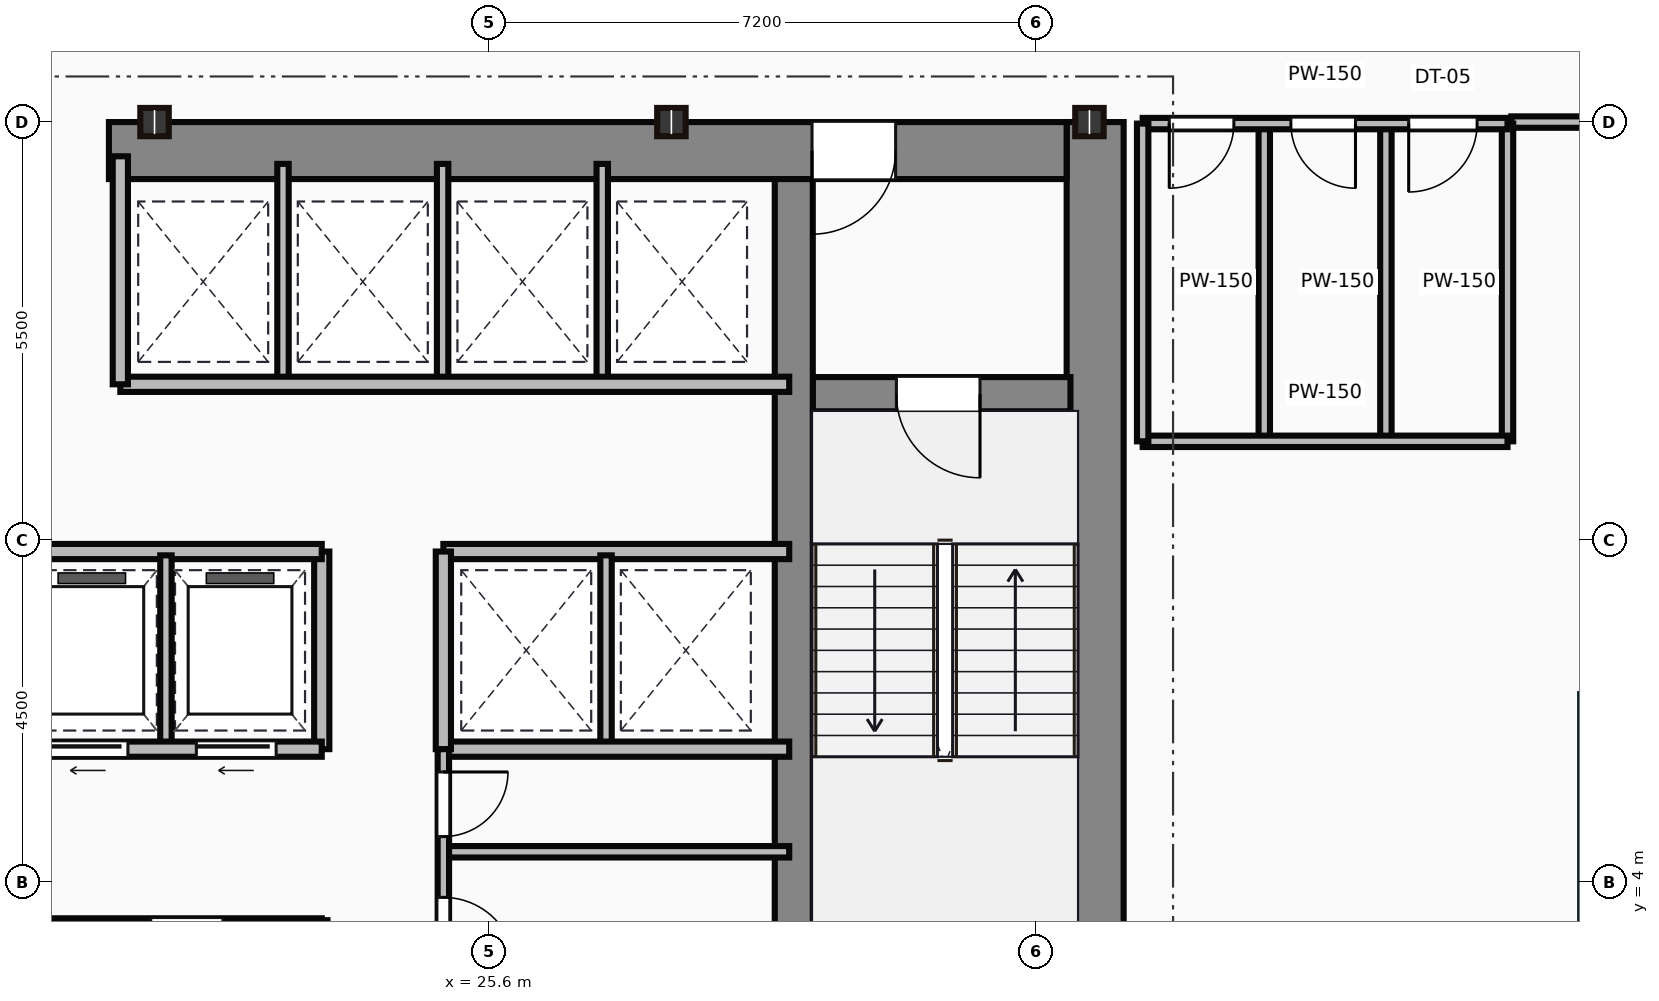
"""IFC4 building model, lengths in metres.
Left out: names, types, materials, properties, quantities, classifications, styles, units other than length and angle.
Written with IfcOpenShell. Run it as: python <this file> out.ifc"""

import sys

from ifc_helpers import new_model, si_unit, direction, frame, frame_2d, origin, origin_2d, place, context, subcontext, project, spatial, rectangle, i_section, extrude, source, transform, mapped, element, fill, save


model = new_model("IFC4")
c1 = context("Model", 3, precision=1e-05, world=origin(), true_north=direction((0.0, 1.0)))
c2 = subcontext(c1, "Body", "Model", "MODEL_VIEW")
j1 = project(units=[si_unit("LENGTHUNIT", "METRE"), si_unit("PLANEANGLEUNIT", "RADIAN")], contexts=[c1])
p1 = place(None, origin())
s1 = spatial("IfcSite", under=j1, at=p1, CompositionType="ELEMENT")
p2 = place(p1, origin())
s2 = spatial("IfcBuilding", under=s1, at=p2, CompositionType="ELEMENT")
p3 = place(p2, frame((0.0, 0.0, 140.6)))
s3 = spatial("IfcBuildingStorey", under=s2, at=p3, CompositionType="ELEMENT", Elevation=140.6)
m1 = source(origin(), c2, "Body", "SweptSolid", [
    extrude(rectangle(XDim=13.1, YDim=0.75, at=frame_2d((6.55, 0.0))), origin(), (0.0, 0.0, 1.0), 3.65),
])
p4 = place(p3, frame((33.575, 0.9, 0.0), z_axis=(0.0, 0.0, 1.0), x_axis=(0.0, 1.0, 0.0)))
e1 = element("IfcWall", 1, at=p4, inside=s3, PredefinedType="SHEAR", context=c2, shape_type="MappedRepresentation", body=[
    mapped(m1, transform((0.0, 0.0, 0.0))),
])
m2 = source(origin(), c2, "Body", "SweptSolid", [
    extrude(rectangle(XDim=12.6, YDim=0.75, at=frame_2d((6.3, 0.0))), origin(), (0.0, 0.0, 1.0), 3.65),
])
p5 = place(p3, frame((20.6, 13.625, 0.0), z_axis=(0.0, 0.0, 1.0), x_axis=(1.0, 0.0, 0.0)))
e2 = element("IfcWall", 2, at=p5, inside=s3, PredefinedType="SHEAR", context=c2, shape_type="MappedRepresentation", body=[
    mapped(m2, transform((0.0, 0.0, 0.0))),
])
p6 = place(p5, frame((9.25, 0.0, 0.0)))
e3 = element("IfcOpeningElement", 3, at=p6, cuts=e2, PredefinedType="OPENING", context=c2, shape_type="SweptSolid", body=[
    extrude(rectangle(XDim=1.1, YDim=2.15, at=frame_2d((0.55, 1.075))), frame((0.0, 0.385, 0.0), z_axis=(0.0, -1.0, 0.0), x_axis=(1.0, 0.0, 0.0)), (0.0, 0.0, 1.0), 0.77),
])
m3 = source(origin(), c2, "Body", "SweptSolid", [
    extrude(rectangle(XDim=12.35, YDim=0.5, at=frame_2d((6.175, 0.0))), origin(), (0.0, 0.0, 1.0), 3.65),
])
p7 = place(p3, frame((29.61, 0.9, 0.0), z_axis=(0.0, 0.0, 1.0), x_axis=(0.0, 1.0, 0.0)))
e4 = element("IfcWall", 4, at=p7, inside=s3, PredefinedType="SHEAR", context=c2, shape_type="MappedRepresentation", body=[
    mapped(m3, transform((0.0, 0.0, 0.0))),
])
m4 = source(origin(), c2, "Body", "SweptSolid", [
    extrude(rectangle(XDim=3.39, YDim=0.45, at=frame_2d((1.695, 0.0))), origin(), (0.0, 0.0, 1.0), 3.65),
])
p8 = place(p3, frame((29.86, 10.42, 0.0), z_axis=(0.0, 0.0, 1.0), x_axis=(1.0, 0.0, 0.0)))
e5 = element("IfcWall", 5, at=p8, inside=s3, PredefinedType="SHEAR", context=c2, shape_type="MappedRepresentation", body=[
    mapped(m4, transform((0.0, 0.0, 0.0))),
])
p9 = place(p8, frame((1.1, 0.0, 0.0)))
e6 = element("IfcOpeningElement", 6, at=p9, cuts=e5, PredefinedType="OPENING", context=c2, shape_type="SweptSolid", body=[
    extrude(rectangle(XDim=1.1, YDim=2.15, at=frame_2d((0.55, 1.075))), frame((0.0, 0.235, 0.0), z_axis=(0.0, -1.0, 0.0), x_axis=(1.0, 0.0, 0.0)), (0.0, 0.0, 1.0), 0.47),
])
m5 = source(origin(), c2, "Body", "SweptSolid", [
    extrude(i_section(OverallWidth=0.374, OverallDepth=0.372, WebThickness=0.016, FlangeThickness=0.026, at=origin_2d()), origin(), (0.0, 0.0, 1.0), 3.65),
])
for number, where, z_axis, x_axis in (
    (7, (21.2, 14.0, 0.0), (0.0, 0.0, 1.0), (1.0, 0.0, 0.0)),
    (8, (28.0, 14.0, 0.0), (0.0, 0.0, 1.0), (1.0, 0.0, 0.0)),
    (9, (33.5, 14.0, 0.0), (0.0, 0.0, 1.0), (1.0, 0.0, 0.0)),
):
    element("IfcColumn", number, at=place(p3, frame(where, z_axis=z_axis, x_axis=x_axis)), inside=s3, PredefinedType="COLUMN", context=c2, shape_type="MappedRepresentation", body=[
        mapped(m5, transform((0.0, 0.0, 0.0))),
    ])
m6 = source(origin(), c2, "Body", "SweptSolid", [
    extrude(rectangle(XDim=10.35, YDim=0.15, at=frame_2d((5.175, 0.0))), origin(), (0.0, 0.0, 1.0), 3.4),
])
p10 = place(p3, frame((13.05, 3.45, 0.0), z_axis=(0.0, 0.0, 1.0), x_axis=(1.0, 0.0, 0.0)))
e10 = element("IfcWall", 10, at=p10, inside=s3, PredefinedType="PARTITIONING", context=c2, shape_type="MappedRepresentation", body=[
    mapped(m6, transform((0.0, 0.0, 0.0))),
])
p11 = place(p10, frame((3.8, 0.0, 0.0)))
e11 = element("IfcOpeningElement", 11, at=p11, cuts=e10, PredefinedType="OPENING", context=c2, shape_type="SweptSolid", body=[
    extrude(rectangle(XDim=0.95, YDim=2.15, at=frame_2d((0.475, 1.075))), frame((0.0, 0.085, 0.0), z_axis=(0.0, -1.0, 0.0), x_axis=(1.0, 0.0, 0.0)), (0.0, 0.0, 1.0), 0.17),
])
p12 = place(p10, frame((8.1, 0.0, 0.0)))
e12 = element("IfcOpeningElement", 12, at=p12, cuts=e10, PredefinedType="OPENING", context=c2, shape_type="SweptSolid", body=[
    extrude(rectangle(XDim=0.95, YDim=2.15, at=frame_2d((0.475, 1.075))), frame((0.0, 0.085, 0.0), z_axis=(0.0, -1.0, 0.0), x_axis=(1.0, 0.0, 0.0)), (0.0, 0.0, 1.0), 0.17),
])
m7 = source(origin(), c2, "Body", "SweptSolid", [
    extrude(rectangle(XDim=2.65, YDim=0.15, at=frame_2d((1.325, 0.0))), origin(), (0.0, 0.0, 1.0), 3.4),
])
p13 = place(p3, frame((23.4, 0.85, 0.0), z_axis=(0.0, 0.0, 1.0), x_axis=(0.0, 1.0, 0.0)))
e13 = element("IfcWall", 13, at=p13, inside=s3, PredefinedType="PARTITIONING", context=c2, shape_type="MappedRepresentation", body=[
    mapped(m7, transform((0.0, 0.0, 0.0))),
])
m8 = source(origin(), c2, "Body", "SweptSolid", [
    extrude(rectangle(XDim=11.85, YDim=0.2, at=frame_2d((5.925, 0.0))), origin(), (0.0, 0.0, 1.0), 3.4),
])
p14 = place(p3, frame((11.55, 5.75, 0.0), z_axis=(0.0, 0.0, 1.0), x_axis=(1.0, 0.0, 0.0)))
e14 = element("IfcWall", 14, at=p14, inside=s3, PredefinedType="PARTITIONING", context=c2, shape_type="MappedRepresentation", body=[
    mapped(m8, transform((0.0, 0.0, 0.0))),
])
p15 = place(p14, frame((0.45, 0.0, 0.0)))
e15 = element("IfcOpeningElement", 15, at=p15, cuts=e14, PredefinedType="OPENING", context=c2, shape_type="SweptSolid", body=[
    extrude(rectangle(XDim=1.05, YDim=2.15, at=frame_2d((0.525, 1.075))), frame((0.0, 0.11, 0.0), z_axis=(0.0, -1.0, 0.0), x_axis=(1.0, 0.0, 0.0)), (0.0, 0.0, 1.0), 0.22),
])
p16 = place(p14, frame((2.4, 0.0, 0.0)))
e16 = element("IfcOpeningElement", 16, at=p16, cuts=e14, PredefinedType="OPENING", context=c2, shape_type="SweptSolid", body=[
    extrude(rectangle(XDim=1.05, YDim=2.15, at=frame_2d((0.525, 1.075))), frame((0.0, 0.11, 0.0), z_axis=(0.0, -1.0, 0.0), x_axis=(1.0, 0.0, 0.0)), (0.0, 0.0, 1.0), 0.22),
])
p17 = place(p14, frame((4.35, 0.0, 0.0)))
e17 = element("IfcOpeningElement", 17, at=p17, cuts=e14, PredefinedType="OPENING", context=c2, shape_type="SweptSolid", body=[
    extrude(rectangle(XDim=1.05, YDim=2.15, at=frame_2d((0.525, 1.075))), frame((0.0, 0.11, 0.0), z_axis=(0.0, -1.0, 0.0), x_axis=(1.0, 0.0, 0.0)), (0.0, 0.0, 1.0), 0.22),
])
p18 = place(p14, frame((6.3, 0.0, 0.0)))
e18 = element("IfcOpeningElement", 18, at=p18, cuts=e14, PredefinedType="OPENING", context=c2, shape_type="SweptSolid", body=[
    extrude(rectangle(XDim=1.05, YDim=2.15, at=frame_2d((0.525, 1.075))), frame((0.0, 0.11, 0.0), z_axis=(0.0, -1.0, 0.0), x_axis=(1.0, 0.0, 0.0)), (0.0, 0.0, 1.0), 0.22),
])
p19 = place(p14, frame((8.25, 0.0, 0.0)))
e19 = element("IfcOpeningElement", 19, at=p19, cuts=e14, PredefinedType="OPENING", context=c2, shape_type="SweptSolid", body=[
    extrude(rectangle(XDim=1.05, YDim=2.15, at=frame_2d((0.525, 1.075))), frame((0.0, 0.11, 0.0), z_axis=(0.0, -1.0, 0.0), x_axis=(1.0, 0.0, 0.0)), (0.0, 0.0, 1.0), 0.22),
])
p20 = place(p14, frame((10.2, 0.0, 0.0)))
e20 = element("IfcOpeningElement", 20, at=p20, cuts=e14, PredefinedType="OPENING", context=c2, shape_type="SweptSolid", body=[
    extrude(rectangle(XDim=1.05, YDim=2.15, at=frame_2d((0.525, 1.075))), frame((0.0, 0.11, 0.0), z_axis=(0.0, -1.0, 0.0), x_axis=(1.0, 0.0, 0.0)), (0.0, 0.0, 1.0), 0.22),
])
p21 = place(p3, frame((11.55, 8.35, 0.0), z_axis=(0.0, 0.0, 1.0), x_axis=(1.0, 0.0, 0.0)))
e21 = element("IfcWall", 21, at=p21, inside=s3, PredefinedType="PARTITIONING", context=c2, shape_type="MappedRepresentation", body=[
    mapped(m8, transform((0.0, 0.0, 0.0))),
])
m9 = source(origin(), c2, "Body", "SweptSolid", [
    extrude(rectangle(XDim=2.6, YDim=0.2, at=frame_2d((1.3, 0.0))), origin(), (0.0, 0.0, 1.0), 3.4),
])
p22 = place(p3, frame((23.4, 5.75, 0.0), z_axis=(0.0, 0.0, 1.0), x_axis=(0.0, 1.0, 0.0)))
e22 = element("IfcWall", 22, at=p22, inside=s3, PredefinedType="PARTITIONING", context=c2, shape_type="MappedRepresentation", body=[
    mapped(m9, transform((0.0, 0.0, 0.0))),
])
m10 = source(origin(), c2, "Body", "SweptSolid", [
    extrude(rectangle(XDim=2.5, YDim=0.15, at=frame_2d((1.25, 0.0))), origin(), (0.0, 0.0, 1.0), 3.4),
])
p23 = place(p3, frame((21.35, 5.8, 0.0), z_axis=(0.0, 0.0, 1.0), x_axis=(0.0, 1.0, 0.0)))
e23 = element("IfcWall", 23, at=p23, inside=s3, PredefinedType="PARTITIONING", context=c2, shape_type="MappedRepresentation", body=[
    mapped(m10, transform((0.0, 0.0, 0.0))),
])
m11 = source(origin(), c2, "Body", "SweptSolid", [
    extrude(rectangle(XDim=8.8, YDim=0.2, at=frame_2d((4.4, 0.0))), origin(), (0.0, 0.0, 1.0), 3.4),
])
p24 = place(p3, frame((20.75, 10.55, 0.0), z_axis=(0.0, 0.0, 1.0), x_axis=(1.0, 0.0, 0.0)))
e24 = element("IfcWall", 24, at=p24, inside=s3, PredefinedType="PARTITIONING", context=c2, shape_type="MappedRepresentation", body=[
    mapped(m11, transform((0.0, 0.0, 0.0))),
])
m12 = source(origin(), c2, "Body", "SweptSolid", [
    extrude(rectangle(XDim=3.0, YDim=0.2, at=frame_2d((1.5, 0.0))), origin(), (0.0, 0.0, 1.0), 3.4),
])
p25 = place(p3, frame((20.75, 10.55, 0.0), z_axis=(0.0, 0.0, 1.0), x_axis=(0.0, 1.0, 0.0)))
e25 = element("IfcWall", 25, at=p25, inside=s3, PredefinedType="PARTITIONING", context=c2, shape_type="MappedRepresentation", body=[
    mapped(m12, transform((0.0, 0.0, 0.0))),
])
m13 = source(origin(), c2, "Body", "SweptSolid", [
    extrude(rectangle(XDim=2.85, YDim=0.15, at=frame_2d((1.425, 0.0))), origin(), (0.0, 0.0, 1.0), 3.4),
])
for number, where, z_axis, x_axis in (
    (26, (22.89, 10.6, 0.0), (0.0, 0.0, 1.0), (0.0, 1.0, 0.0)),
    (27, (24.99, 10.6, 0.0), (0.0, 0.0, 1.0), (0.0, 1.0, 0.0)),
    (28, (27.09, 10.6, 0.0), (0.0, 0.0, 1.0), (0.0, 1.0, 0.0)),
):
    element("IfcWall", number, at=place(p3, frame(where, z_axis=z_axis, x_axis=x_axis)), inside=s3, PredefinedType="PARTITIONING", context=c2, shape_type="MappedRepresentation", body=[
        mapped(m13, transform((0.0, 0.0, 0.0))),
    ])
m14 = source(origin(), c2, "Body", "SweptSolid", [
    extrude(rectangle(XDim=4.55, YDim=0.2, at=frame_2d((2.275, 0.0))), origin(), (0.0, 0.0, 1.0), 3.4),
])
for number, where, z_axis, x_axis in (
    (29, (25.0, 8.35, 0.0), (0.0, 0.0, 1.0), (1.0, 0.0, 0.0)),
    (30, (25.0, 5.75, 0.0), (0.0, 0.0, 1.0), (1.0, 0.0, 0.0)),
):
    element("IfcWall", number, at=place(p3, frame(where, z_axis=z_axis, x_axis=x_axis)), inside=s3, PredefinedType="PARTITIONING", context=c2, shape_type="MappedRepresentation", body=[
        mapped(m14, transform((0.0, 0.0, 0.0))),
    ])
p26 = place(p3, frame((25.0, 5.75, 0.0), z_axis=(0.0, 0.0, 1.0), x_axis=(0.0, 1.0, 0.0)))
e31 = element("IfcWall", 31, at=p26, inside=s3, PredefinedType="PARTITIONING", context=c2, shape_type="MappedRepresentation", body=[
    mapped(m9, transform((0.0, 0.0, 0.0))),
])
p27 = place(p3, frame((27.14, 5.8, 0.0), z_axis=(0.0, 0.0, 1.0), x_axis=(0.0, 1.0, 0.0)))
e32 = element("IfcWall", 32, at=p27, inside=s3, PredefinedType="PARTITIONING", context=c2, shape_type="MappedRepresentation", body=[
    mapped(m10, transform((0.0, 0.0, 0.0))),
])
m15 = source(origin(), c2, "Body", "SweptSolid", [
    extrude(rectangle(XDim=4.9, YDim=0.15, at=frame_2d((2.45, 0.0))), origin(), (0.0, 0.0, 1.0), 3.4),
])
p28 = place(p3, frame((25.0, 0.85, 0.0), z_axis=(0.0, 0.0, 1.0), x_axis=(0.0, 1.0, 0.0)))
e33 = element("IfcWall", 33, at=p28, inside=s3, PredefinedType="PARTITIONING", context=c2, shape_type="MappedRepresentation", body=[
    mapped(m15, transform((0.0, 0.0, 0.0))),
])
p29 = place(p28, frame((2.0, 0.0, 0.0)))
e34 = element("IfcOpeningElement", 34, at=p29, cuts=e33, PredefinedType="OPENING", context=c2, shape_type="SweptSolid", body=[
    extrude(rectangle(XDim=0.95, YDim=2.15, at=frame_2d((0.475, 1.075))), frame((0.0, 0.085, 0.0), z_axis=(0.0, -1.0, 0.0), x_axis=(1.0, 0.0, 0.0)), (0.0, 0.0, 1.0), 0.17),
])
p30 = place(p28, frame((3.75, 0.0, 0.0)))
e35 = element("IfcOpeningElement", 35, at=p30, cuts=e33, PredefinedType="OPENING", context=c2, shape_type="SweptSolid", body=[
    extrude(rectangle(XDim=0.85, YDim=2.15, at=frame_2d((0.425, 1.075))), frame((0.0, 0.085, 0.0), z_axis=(0.0, -1.0, 0.0), x_axis=(1.0, 0.0, 0.0)), (0.0, 0.0, 1.0), 0.17),
])
m16 = source(origin(), c2, "Body", "SweptSolid", [
    extrude(rectangle(XDim=4.55, YDim=0.15, at=frame_2d((2.275, 0.0))), origin(), (0.0, 0.0, 1.0), 3.4),
])
p31 = place(p3, frame((25.0, 4.4, 0.0), z_axis=(0.0, 0.0, 1.0), x_axis=(1.0, 0.0, 0.0)))
e36 = element("IfcWall", 36, at=p31, inside=s3, PredefinedType="PARTITIONING", context=c2, shape_type="MappedRepresentation", body=[
    mapped(m16, transform((0.0, 0.0, 0.0))),
])
m17 = source(origin(), c2, "Body", "SweptSolid", [
    extrude(rectangle(XDim=4.8, YDim=0.15, at=frame_2d((2.4, 0.0))), origin(), (0.0, 0.0, 1.0), 2.76),
])
p32 = place(p3, frame((34.2, 13.98, 0.0), z_axis=(0.0, 0.0, 1.0), x_axis=(1.0, 0.0, 0.0)))
e37 = element("IfcWall", 37, at=p32, inside=s3, PredefinedType="PARTITIONING", context=c2, shape_type="MappedRepresentation", body=[
    mapped(m17, transform((0.0, 0.0, 0.0))),
])
p33 = place(p32, frame((0.35, 0.0, 0.0)))
e38 = element("IfcOpeningElement", 38, at=p33, cuts=e37, PredefinedType="OPENING", context=c2, shape_type="SweptSolid", body=[
    extrude(rectangle(XDim=0.85, YDim=2.1, at=frame_2d((0.425, 1.05))), frame((0.0, 0.085, 0.0), z_axis=(0.0, -1.0, 0.0), x_axis=(1.0, 0.0, 0.0)), (0.0, 0.0, 1.0), 0.17),
])
p34 = place(p32, frame((1.95, 0.0, 0.0)))
e39 = element("IfcOpeningElement", 39, at=p34, cuts=e37, PredefinedType="OPENING", context=c2, shape_type="SweptSolid", body=[
    extrude(rectangle(XDim=0.85, YDim=2.1, at=frame_2d((0.425, 1.05))), frame((0.0, 0.085, 0.0), z_axis=(0.0, -1.0, 0.0), x_axis=(1.0, 0.0, 0.0)), (0.0, 0.0, 1.0), 0.17),
])
p35 = place(p32, frame((3.5, 0.0, 0.0)))
e40 = element("IfcOpeningElement", 40, at=p35, cuts=e37, PredefinedType="OPENING", context=c2, shape_type="SweptSolid", body=[
    extrude(rectangle(XDim=0.9, YDim=2.1, at=frame_2d((0.45, 1.05))), frame((0.0, 0.085, 0.0), z_axis=(0.0, -1.0, 0.0), x_axis=(1.0, 0.0, 0.0)), (0.0, 0.0, 1.0), 0.17),
])
m18 = source(origin(), c2, "Body", "SweptSolid", [
    extrude(rectangle(XDim=4.8, YDim=0.15, at=frame_2d((2.4, 0.0))), origin(), (0.0, 0.0, 1.0), 3.4),
])
p36 = place(p3, frame((34.2, 9.8, 0.0), z_axis=(0.0, 0.0, 1.0), x_axis=(1.0, 0.0, 0.0)))
e41 = element("IfcWall", 41, at=p36, inside=s3, PredefinedType="PARTITIONING", context=c2, shape_type="MappedRepresentation", body=[
    mapped(m18, transform((0.0, 0.0, 0.0))),
])
m19 = source(origin(), c2, "Body", "SweptSolid", [
    extrude(rectangle(XDim=4.18, YDim=0.15, at=frame_2d((2.09, 0.0))), origin(), (0.0, 0.0, 1.0), 3.4),
])
for number, where, z_axis, x_axis in (
    (42, (39.0, 9.8, 0.0), (0.0, 0.0, 1.0), (0.0, 1.0, 0.0)),
    (43, (34.2, 9.8, 0.0), (0.0, 0.0, 1.0), (0.0, 1.0, 0.0)),
    (44, (35.8, 9.8, 0.0), (0.0, 0.0, 1.0), (0.0, 1.0, 0.0)),
    (45, (37.4, 9.8, 0.0), (0.0, 0.0, 1.0), (0.0, 1.0, 0.0)),
):
    element("IfcWall", number, at=place(p3, frame(where, z_axis=z_axis, x_axis=x_axis)), inside=s3, PredefinedType="PARTITIONING", context=c2, shape_type="MappedRepresentation", body=[
        mapped(m19, transform((0.0, 0.0, 0.0))),
    ])
m20 = source(origin(), c2, "Body", "SweptSolid", [
    extrude(rectangle(XDim=1.75, YDim=0.15, at=frame_2d((0.875, 0.0))), origin(), (0.0, 0.0, 1.0), 2.76),
])
p37 = place(p3, frame((40.8, 14.0, 0.0), z_axis=(0.0, 0.0, 1.0), x_axis=(-1.0, 0.0, 0.0)))
e46 = element("IfcWall", 46, at=p37, inside=s3, PredefinedType="PARTITIONING", context=c2, shape_type="MappedRepresentation", body=[
    mapped(m20, transform((0.0, 0.0, 0.0))),
])
m21 = source(origin(), c2, "Body", "SweptSolid", [
    extrude(rectangle(XDim=1.1, YDim=2.15, at=frame_2d((0.55, 1.075))), frame((0.0, 0.025, 0.0), z_axis=(0.0, -1.0, 0.0), x_axis=(1.0, 0.0, 0.0)), (0.0, 0.0, 1.0), 0.05),
])
p38 = place(p9, frame((1.1, 0.0, 0.0), z_axis=(0.0, 0.0, 1.0), x_axis=(-1.0, 0.0, 0.0)))
e47 = element("IfcDoor", 47, at=p38, inside=s3, OperationType="SINGLE_SWING_RIGHT", PredefinedType="DOOR", context=c2, shape_type="MappedRepresentation", body=[
    mapped(m21, transform((0.0, 0.0, 0.0))),
])
fill(e6, e47)
p39 = place(p6, origin())
e48 = element("IfcDoor", 48, at=p39, inside=s3, OperationType="SINGLE_SWING_LEFT", PredefinedType="DOOR", context=c2, shape_type="MappedRepresentation", body=[
    mapped(m21, transform((0.0, 0.0, 0.0))),
])
fill(e3, e48)
m22 = source(origin(), c2, "Body", "SweptSolid", [
    extrude(rectangle(XDim=1.05, YDim=2.15, at=frame_2d((0.525, 1.075))), frame((0.0, 0.025, 0.0), z_axis=(0.0, -1.0, 0.0), x_axis=(1.0, 0.0, 0.0)), (0.0, 0.0, 1.0), 0.05),
])
p40 = place(p19, frame((1.05, 0.0, 0.0), z_axis=(0.0, 0.0, 1.0), x_axis=(-1.0, 0.0, 0.0)))
e49 = element("IfcDoor", 49, at=p40, inside=s3, OperationType="SLIDING_TO_LEFT", PredefinedType="DOOR", context=c2, shape_type="MappedRepresentation", body=[
    mapped(m22, transform((0.0, 0.0, 0.0))),
])
fill(e19, e49)
p41 = place(p20, frame((1.05, 0.0, 0.0), z_axis=(0.0, 0.0, 1.0), x_axis=(-1.0, 0.0, 0.0)))
e50 = element("IfcDoor", 50, at=p41, inside=s3, OperationType="SLIDING_TO_LEFT", PredefinedType="DOOR", context=c2, shape_type="MappedRepresentation", body=[
    mapped(m22, transform((0.0, 0.0, 0.0))),
])
fill(e20, e50)
m23 = source(origin(), c2, "Body", "SweptSolid", [
    extrude(rectangle(XDim=0.95, YDim=2.15, at=frame_2d((0.475, 1.075))), frame((0.0, 0.025, 0.0), z_axis=(0.0, -1.0, 0.0), x_axis=(1.0, 0.0, 0.0)), (0.0, 0.0, 1.0), 0.05),
])
p42 = place(p29, origin())
e51 = element("IfcDoor", 51, at=p42, inside=s3, OperationType="SINGLE_SWING_LEFT", PredefinedType="DOOR", context=c2, shape_type="MappedRepresentation", body=[
    mapped(m23, transform((0.0, 0.0, 0.0))),
])
fill(e34, e51)
m24 = source(origin(), c2, "Body", "SweptSolid", [
    extrude(rectangle(XDim=0.85, YDim=2.15, at=frame_2d((0.425, 1.075))), frame((0.0, 0.025, 0.0), z_axis=(0.0, -1.0, 0.0), x_axis=(1.0, 0.0, 0.0)), (0.0, 0.0, 1.0), 0.05),
])
p43 = place(p30, origin())
e52 = element("IfcDoor", 52, at=p43, inside=s3, OperationType="SINGLE_SWING_RIGHT", PredefinedType="DOOR", context=c2, shape_type="MappedRepresentation", body=[
    mapped(m24, transform((0.0, 0.0, 0.0))),
])
fill(e35, e52)
m25 = source(origin(), c2, "Body", "SweptSolid", [
    extrude(rectangle(XDim=0.85, YDim=2.1, at=frame_2d((0.425, 1.05))), frame((0.0, 0.025, 0.0), z_axis=(0.0, -1.0, 0.0), x_axis=(1.0, 0.0, 0.0)), (0.0, 0.0, 1.0), 0.05),
])
p44 = place(p33, frame((0.85, 0.0, 0.0), z_axis=(0.0, 0.0, 1.0), x_axis=(-1.0, 0.0, 0.0)))
e53 = element("IfcDoor", 53, at=p44, inside=s3, OperationType="SINGLE_SWING_LEFT", PredefinedType="DOOR", context=c2, shape_type="MappedRepresentation", body=[
    mapped(m25, transform((0.0, 0.0, 0.0))),
])
fill(e38, e53)
p45 = place(p34, frame((0.85, 0.0, 0.0), z_axis=(0.0, 0.0, 1.0), x_axis=(-1.0, 0.0, 0.0)))
e54 = element("IfcDoor", 54, at=p45, inside=s3, OperationType="SINGLE_SWING_RIGHT", PredefinedType="DOOR", context=c2, shape_type="MappedRepresentation", body=[
    mapped(m25, transform((0.0, 0.0, 0.0))),
])
fill(e39, e54)
m26 = source(origin(), c2, "Body", "SweptSolid", [
    extrude(rectangle(XDim=0.9, YDim=2.1, at=frame_2d((0.45, 1.05))), frame((0.0, 0.025, 0.0), z_axis=(0.0, -1.0, 0.0), x_axis=(1.0, 0.0, 0.0)), (0.0, 0.0, 1.0), 0.05),
])
p46 = place(p35, frame((0.9, 0.0, 0.0), z_axis=(0.0, 0.0, 1.0), x_axis=(-1.0, 0.0, 0.0)))
e55 = element("IfcDoor", 55, at=p46, inside=s3, OperationType="SINGLE_SWING_LEFT", PredefinedType="DOOR", context=c2, shape_type="MappedRepresentation", body=[
    mapped(m26, transform((0.0, 0.0, 0.0))),
])
fill(e40, e55)
save(model, sys.argv[1])
